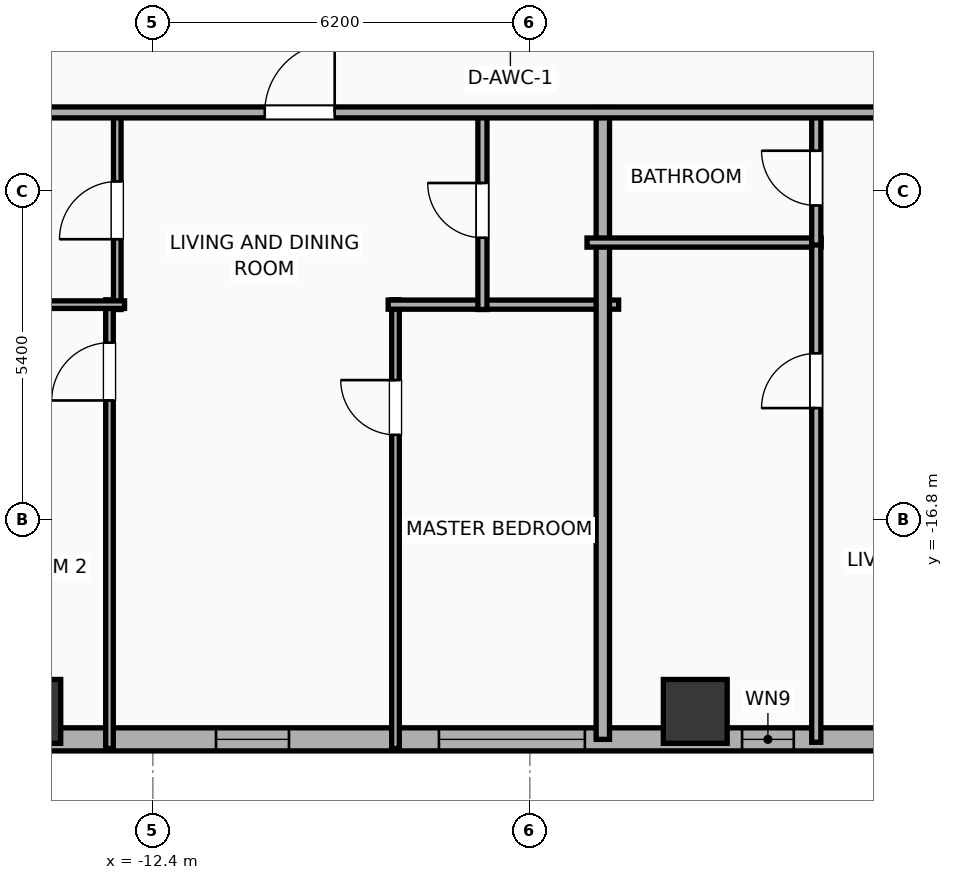
"""IFC4 building model, lengths in metres.
Left out: names, types, materials, properties, quantities, classifications, styles, units other than length and angle.
Written with IfcOpenShell. Run it as: python <this file> out.ifc"""

import sys

from ifc_helpers import new_model, si_unit, direction, frame, frame_2d, origin, origin_2d, place, context, subcontext, project, spatial, rectangle, hollow_rectangle, extrude, element, fill, save


model = new_model("IFC4")
c1 = context("Model", 3, precision=1e-05, world=origin(), true_north=direction((0.0, 1.0)))
c2 = subcontext(c1, "Body", "Model", "MODEL_VIEW")
j1 = project(units=[si_unit("LENGTHUNIT", "METRE"), si_unit("PLANEANGLEUNIT", "RADIAN")], contexts=[c1])
p1 = place(None, origin())
s1 = spatial("IfcSite", under=j1, at=p1, CompositionType="ELEMENT")
p2 = place(p1, origin())
s2 = spatial("IfcBuilding", under=s1, at=p2, CompositionType="ELEMENT")
p3 = place(p2, frame((0.0, 0.0, 101.4)))
s3 = spatial("IfcBuildingStorey", under=s2, at=p3, CompositionType="ELEMENT", Elevation=101.4)
for number, where, z_axis, x_axis in (
    (1, (-14.44, -19.95, 0.0), (0.0, 0.0, 1.0), (1.0, 0.0, 0.0)),
    (2, (-3.48, -19.95, 0.0), (0.0, 0.0, 1.0), (1.0, 0.0, 0.0)),
):
    element("IfcColumn", number, at=place(p3, frame(where, z_axis=z_axis, x_axis=x_axis)), inside=s3, PredefinedType="COLUMN", context=c2, shape_type="SweptSolid", body=[
        extrude(hollow_rectangle(XDim=1.05, YDim=1.05, WallThickness=0.036, at=origin_2d()), origin(), (0.0, 0.0, 1.0), 3.9),
    ])
p4 = place(p3, frame((29.381, -20.41, 0.0), z_axis=(0.0, 0.0, 1.0), x_axis=(-1.0, 0.0, 0.0)))
e3 = element("IfcWall", 3, at=p4, inside=s3, PredefinedType="ELEMENTEDWALL", context=c2, shape_type="SweptSolid", body=[
    extrude(rectangle(XDim=54.763, YDim=0.38, at=frame_2d((27.381, 0.0))), origin(), (0.0, 0.0, 1.0), 3.65),
])
p5 = place(p4, frame((6.495, 0.0, 0.75)))
e4 = element("IfcOpeningElement", 4, at=p5, cuts=e3, PredefinedType="OPENING", context=c2, shape_type="SweptSolid", body=[
    extrude(rectangle(XDim=2.4, YDim=2.1, at=frame_2d((1.2, 1.05))), frame((0.0, 0.2, 0.0), z_axis=(0.0, -1.0, 0.0), x_axis=(1.0, 0.0, 0.0)), (0.0, 0.0, 1.0), 0.4),
])
p6 = place(p4, frame((17.686, 0.0, 0.75)))
e5 = element("IfcOpeningElement", 5, at=p6, cuts=e3, PredefinedType="OPENING", context=c2, shape_type="SweptSolid", body=[
    extrude(rectangle(XDim=2.4, YDim=2.1, at=frame_2d((1.2, 1.05))), frame((0.0, 0.2, 0.0), z_axis=(0.0, -1.0, 0.0), x_axis=(1.0, 0.0, 0.0)), (0.0, 0.0, 1.0), 0.4),
])
p7 = place(p4, frame((34.677, 0.0, 0.75)))
e6 = element("IfcOpeningElement", 6, at=p7, cuts=e3, PredefinedType="OPENING", context=c2, shape_type="SweptSolid", body=[
    extrude(rectangle(XDim=2.4, YDim=2.1, at=frame_2d((1.2, 1.05))), frame((0.0, 0.2, 0.0), z_axis=(0.0, -1.0, 0.0), x_axis=(1.0, 0.0, 0.0)), (0.0, 0.0, 1.0), 0.4),
])
p8 = place(p4, frame((45.867, 0.0, 0.75)))
e7 = element("IfcOpeningElement", 7, at=p8, cuts=e3, PredefinedType="OPENING", context=c2, shape_type="SweptSolid", body=[
    extrude(rectangle(XDim=2.4, YDim=2.1, at=frame_2d((1.2, 1.05))), frame((0.0, 0.2, 0.0), z_axis=(0.0, -1.0, 0.0), x_axis=(1.0, 0.0, 0.0)), (0.0, 0.0, 1.0), 0.4),
])
p9 = place(p4, frame((52.281, 0.0, 0.75)))
e8 = element("IfcOpeningElement", 8, at=p9, cuts=e3, PredefinedType="OPENING", context=c2, shape_type="SweptSolid", body=[
    extrude(rectangle(XDim=1.2, YDim=2.05, at=frame_2d((0.6, 1.025))), frame((0.0, 0.2, 0.0), z_axis=(0.0, -1.0, 0.0), x_axis=(1.0, 0.0, 0.0)), (0.0, 0.0, 1.0), 0.4),
])
p10 = place(p4, frame((49.641, 0.0, 0.75)))
e9 = element("IfcOpeningElement", 9, at=p10, cuts=e3, PredefinedType="OPENING", context=c2, shape_type="SweptSolid", body=[
    extrude(rectangle(XDim=1.2, YDim=2.05, at=frame_2d((0.6, 1.025))), frame((0.0, 0.2, 0.0), z_axis=(0.0, -1.0, 0.0), x_axis=(1.0, 0.0, 0.0)), (0.0, 0.0, 1.0), 0.4),
])
p11 = place(p4, frame((39.543, 0.0, 0.75)))
e10 = element("IfcOpeningElement", 10, at=p11, cuts=e3, PredefinedType="OPENING", context=c2, shape_type="SweptSolid", body=[
    extrude(rectangle(XDim=1.2, YDim=2.05, at=frame_2d((0.6, 1.025))), frame((0.0, 0.2, 0.0), z_axis=(0.0, -1.0, 0.0), x_axis=(1.0, 0.0, 0.0)), (0.0, 0.0, 1.0), 0.4),
])
p12 = place(p4, frame((44.538, 0.0, 0.75)))
e11 = element("IfcOpeningElement", 11, at=p12, cuts=e3, PredefinedType="OPENING", context=c2, shape_type="SweptSolid", body=[
    extrude(rectangle(XDim=0.52, YDim=2.05, at=frame_2d((0.26, 1.025))), frame((0.0, 0.2, 0.0), z_axis=(0.0, -1.0, 0.0), x_axis=(1.0, 0.0, 0.0)), (0.0, 0.0, 1.0), 0.4),
])
p13 = place(p4, frame((28.206, 0.0, 0.75)))
e12 = element("IfcOpeningElement", 12, at=p13, cuts=e3, PredefinedType="OPENING", context=c2, shape_type="SweptSolid", body=[
    extrude(rectangle(XDim=1.2, YDim=2.05, at=frame_2d((0.6, 1.025))), frame((0.0, 0.2, 0.0), z_axis=(0.0, -1.0, 0.0), x_axis=(1.0, 0.0, 0.0)), (0.0, 0.0, 1.0), 0.4),
])
p14 = place(p4, frame((31.241, 0.0, 0.75)))
e13 = element("IfcOpeningElement", 13, at=p14, cuts=e3, PredefinedType="OPENING", context=c2, shape_type="SweptSolid", body=[
    extrude(rectangle(XDim=0.85, YDim=2.05, at=frame_2d((0.425, 1.025))), frame((0.0, 0.2, 0.0), z_axis=(0.0, -1.0, 0.0), x_axis=(1.0, 0.0, 0.0)), (0.0, 0.0, 1.0), 0.4),
])
p15 = place(p4, frame((24.561, 0.0, 0.75)))
e14 = element("IfcOpeningElement", 14, at=p15, cuts=e3, PredefinedType="OPENING", context=c2, shape_type="SweptSolid", body=[
    extrude(rectangle(XDim=1.2, YDim=2.05, at=frame_2d((0.6, 1.025))), frame((0.0, 0.2, 0.0), z_axis=(0.0, -1.0, 0.0), x_axis=(1.0, 0.0, 0.0)), (0.0, 0.0, 1.0), 0.4),
])
p16 = place(p4, frame((22.561, 0.0, 0.75)))
e15 = element("IfcOpeningElement", 15, at=p16, cuts=e3, PredefinedType="OPENING", context=c2, shape_type="SweptSolid", body=[
    extrude(rectangle(XDim=0.52, YDim=2.05, at=frame_2d((0.26, 1.025))), frame((0.0, 0.2, 0.0), z_axis=(0.0, -1.0, 0.0), x_axis=(1.0, 0.0, 0.0)), (0.0, 0.0, 1.0), 0.4),
])
p17 = place(p4, frame((13.886, 0.0, 0.75)))
e16 = element("IfcOpeningElement", 16, at=p17, cuts=e3, PredefinedType="OPENING", context=c2, shape_type="SweptSolid", body=[
    extrude(rectangle(XDim=1.2, YDim=2.05, at=frame_2d((0.6, 1.025))), frame((0.0, 0.2, 0.0), z_axis=(0.0, -1.0, 0.0), x_axis=(1.0, 0.0, 0.0)), (0.0, 0.0, 1.0), 0.4),
])
p18 = place(p4, frame((11.694, 0.0, 0.75)))
e17 = element("IfcOpeningElement", 17, at=p18, cuts=e3, PredefinedType="OPENING", context=c2, shape_type="SweptSolid", body=[
    extrude(rectangle(XDim=0.85, YDim=2.05, at=frame_2d((0.425, 1.025))), frame((0.0, 0.2, 0.0), z_axis=(0.0, -1.0, 0.0), x_axis=(1.0, 0.0, 0.0)), (0.0, 0.0, 1.0), 0.4),
])
p19 = place(p4, frame((3.286, 0.0, 0.75)))
e18 = element("IfcOpeningElement", 18, at=p19, cuts=e3, PredefinedType="OPENING", context=c2, shape_type="SweptSolid", body=[
    extrude(rectangle(XDim=1.2, YDim=2.05, at=frame_2d((0.6, 1.025))), frame((0.0, 0.2, 0.0), z_axis=(0.0, -1.0, 0.0), x_axis=(1.0, 0.0, 0.0)), (0.0, 0.0, 1.0), 0.4),
])
p20 = place(p4, frame((0.816, 0.0, 0.75)))
e19 = element("IfcOpeningElement", 19, at=p20, cuts=e3, PredefinedType="OPENING", context=c2, shape_type="SweptSolid", body=[
    extrude(rectangle(XDim=1.2, YDim=2.05, at=frame_2d((0.6, 1.025))), frame((0.0, 0.2, 0.0), z_axis=(0.0, -1.0, 0.0), x_axis=(1.0, 0.0, 0.0)), (0.0, 0.0, 1.0), 0.4),
])
p21 = place(p3, frame((-13.113, -20.56, 0.0), z_axis=(0.0, 0.0, 1.0), x_axis=(0.0, 1.0, 0.0)))
e20 = element("IfcWall", 20, at=p21, inside=s3, PredefinedType="PARTITIONING", context=c2, shape_type="SweptSolid", body=[
    extrude(rectangle(XDim=7.379, YDim=0.125, at=frame_2d((3.689, 0.0))), origin(), (0.0, 0.0, 1.0), 3.65),
])
p22 = place(p21, frame((5.723, 0.0, 0.0)))
e21 = element("IfcOpeningElement", 21, at=p22, cuts=e20, PredefinedType="OPENING", context=c2, shape_type="SweptSolid", body=[
    extrude(rectangle(XDim=0.95, YDim=2.05, at=frame_2d((0.475, 1.025))), frame((0.0, 0.073, 0.0), z_axis=(0.0, -1.0, 0.0), x_axis=(1.0, 0.0, 0.0)), (0.0, 0.0, 1.0), 0.145),
])
p23 = place(p3, frame((-8.41, -20.56, 0.0), z_axis=(0.0, 0.0, 1.0), x_axis=(0.0, 1.0, 0.0)))
e22 = element("IfcWall", 22, at=p23, inside=s3, PredefinedType="PARTITIONING", context=c2, shape_type="SweptSolid", body=[
    extrude(rectangle(XDim=7.379, YDim=0.125, at=frame_2d((3.689, 0.0))), origin(), (0.0, 0.0, 1.0), 3.65),
])
p24 = place(p23, frame((5.158, 0.0, 0.0)))
e23 = element("IfcOpeningElement", 23, at=p24, cuts=e22, PredefinedType="OPENING", context=c2, shape_type="SweptSolid", body=[
    extrude(rectangle(XDim=0.9, YDim=2.05, at=frame_2d((0.45, 1.025))), frame((0.0, 0.073, 0.0), z_axis=(0.0, -1.0, 0.0), x_axis=(1.0, 0.0, 0.0)), (0.0, 0.0, 1.0), 0.145),
])
p25 = place(p3, frame((-8.53, -13.261, 0.0), z_axis=(0.0, 0.0, 1.0), x_axis=(1.0, 0.0, 0.0)))
e24 = element("IfcWall", 24, at=p25, inside=s3, PredefinedType="PLUMBINGWALL", context=c2, shape_type="SweptSolid", body=[
    extrude(rectangle(XDim=3.79, YDim=0.15, at=frame_2d((1.895, 0.0))), origin(), (0.0, 0.0, 1.0), 3.65),
])
p26 = place(p3, frame((-12.985, -13.341, 0.0), z_axis=(0.0, 0.0, 1.0), x_axis=(0.0, 1.0, 0.0)))
e25 = element("IfcWall", 25, at=p26, inside=s3, PredefinedType="PARTITIONING", context=c2, shape_type="SweptSolid", body=[
    extrude(rectangle(XDim=3.261, YDim=0.125, at=frame_2d((1.63, 0.0))), origin(), (0.0, 0.0, 1.0), 3.65),
])
p27 = place(p26, frame((1.156, 0.0, 0.0)))
e26 = element("IfcOpeningElement", 26, at=p27, cuts=e25, PredefinedType="OPENING", context=c2, shape_type="SweptSolid", body=[
    extrude(rectangle(XDim=0.95, YDim=2.05, at=frame_2d((0.475, 1.025))), frame((0.0, 0.073, 0.0), z_axis=(0.0, -1.0, 0.0), x_axis=(1.0, 0.0, 0.0)), (0.0, 0.0, 1.0), 0.145),
])
p28 = place(p3, frame((-16.06, -13.261, 0.0), z_axis=(0.0, 0.0, 1.0), x_axis=(1.0, 0.0, 0.0)))
e27 = element("IfcWall", 27, at=p28, inside=s3, PredefinedType="PARTITIONING", context=c2, shape_type="SweptSolid", body=[
    extrude(rectangle(XDim=3.195, YDim=0.125, at=frame_2d((1.598, 0.0))), origin(), (0.0, 0.0, 1.0), 3.65),
])
p29 = place(p3, frame((-6.98, -13.341, 0.0), z_axis=(0.0, 0.0, 1.0), x_axis=(0.0, 1.0, 0.0)))
e28 = element("IfcWall", 28, at=p29, inside=s3, PredefinedType="PLUMBINGWALL", context=c2, shape_type="SweptSolid", body=[
    extrude(rectangle(XDim=3.261, YDim=0.15, at=frame_2d((1.63, 0.0))), origin(), (0.0, 0.0, 1.0), 3.65),
])
p30 = place(p29, frame((1.18, 0.0, 0.0)))
e29 = element("IfcOpeningElement", 29, at=p30, cuts=e28, PredefinedType="OPENING", context=c2, shape_type="SweptSolid", body=[
    extrude(rectangle(XDim=0.9, YDim=2.05, at=frame_2d((0.45, 1.025))), frame((0.0, 0.085, 0.0), z_axis=(0.0, -1.0, 0.0), x_axis=(1.0, 0.0, 0.0)), (0.0, 0.0, 1.0), 0.17),
])
p31 = place(p3, frame((-5.0, -20.41, 0.0), z_axis=(0.0, 0.0, 1.0), x_axis=(0.0, 1.0, 0.0)))
e30 = element("IfcWall", 30, at=p31, inside=s3, PredefinedType="PARTITIONING", context=c2, shape_type="SweptSolid", body=[
    extrude(rectangle(XDim=10.39, YDim=0.22, at=frame_2d((5.195, 0.0))), origin(), (0.0, 0.0, 1.0), 3.65),
])
p32 = place(p3, frame((-5.26, -12.24, 0.0), z_axis=(0.0, 0.0, 1.0), x_axis=(1.0, 0.0, 0.0)))
e31 = element("IfcWall", 31, at=p32, inside=s3, PredefinedType="PLUMBINGWALL", context=c2, shape_type="SweptSolid", body=[
    extrude(rectangle(XDim=3.85, YDim=0.15, at=frame_2d((1.925, 0.0))), origin(), (0.0, 0.0, 1.0), 3.65),
])
p33 = place(p3, frame((-1.49, -20.458, 0.0), z_axis=(0.0, 0.0, 1.0), x_axis=(0.0, 1.0, 0.0)))
e32 = element("IfcWall", 32, at=p33, inside=s3, PredefinedType="PLUMBINGWALL", context=c2, shape_type="SweptSolid", body=[
    extrude(rectangle(XDim=8.258, YDim=0.15, at=frame_2d((4.129, 0.0))), origin(), (0.0, 0.0, 1.0), 3.65),
])
p34 = place(p33, frame((5.496, 0.0, 0.0)))
e33 = element("IfcOpeningElement", 33, at=p34, cuts=e32, PredefinedType="OPENING", context=c2, shape_type="SweptSolid", body=[
    extrude(rectangle(XDim=0.9, YDim=2.05, at=frame_2d((0.45, 1.025))), frame((0.0, 0.085, 0.0), z_axis=(0.0, -1.0, 0.0), x_axis=(1.0, 0.0, 0.0)), (0.0, 0.0, 1.0), 0.17),
])
p35 = place(p3, frame((-1.49, -12.28, 0.0), z_axis=(0.0, 0.0, 1.0), x_axis=(0.0, 1.0, 0.0)))
e34 = element("IfcWall", 34, at=p35, inside=s3, PredefinedType="PLUMBINGWALL", context=c2, shape_type="SweptSolid", body=[
    extrude(rectangle(XDim=2.2, YDim=0.15, at=frame_2d((1.1, 0.0))), origin(), (0.0, 0.0, 1.0), 3.65),
])
p36 = place(p35, frame((0.65, 0.0, 0.0)))
e35 = element("IfcOpeningElement", 35, at=p36, cuts=e34, PredefinedType="OPENING", context=c2, shape_type="SweptSolid", body=[
    extrude(rectangle(XDim=0.9, YDim=2.05, at=frame_2d((0.45, 1.025))), frame((0.0, 0.085, 0.0), z_axis=(0.0, -1.0, 0.0), x_axis=(1.0, 0.0, 0.0)), (0.0, 0.0, 1.0), 0.17),
])
p37 = place(p3, frame((-29.21, -10.1, 0.0), z_axis=(0.0, 0.0, 1.0), x_axis=(1.0, 0.0, 0.0)))
e36 = element("IfcWall", 36, at=p37, inside=s3, PredefinedType="PARTITIONING", context=c2, shape_type="SweptSolid", body=[
    extrude(rectangle(XDim=62.42, YDim=0.18, at=frame_2d((31.21, 0.0))), origin(), (0.0, 0.0, 1.0), 3.65),
])
p38 = place(p37, frame((3.033, 0.0, 0.0)))
e37 = element("IfcOpeningElement", 37, at=p38, cuts=e36, PredefinedType="OPENING", context=c2, shape_type="SweptSolid", body=[
    extrude(rectangle(XDim=0.9, YDim=2.05, at=frame_2d((0.45, 1.025))), frame((0.0, 0.1, 0.0), z_axis=(0.0, -1.0, 0.0), x_axis=(1.0, 0.0, 0.0)), (0.0, 0.0, 1.0), 0.2),
])
p39 = place(p37, frame((9.768, 0.0, 0.0)))
e38 = element("IfcOpeningElement", 38, at=p39, cuts=e36, PredefinedType="OPENING", context=c2, shape_type="SweptSolid", body=[
    extrude(rectangle(XDim=0.9, YDim=2.05, at=frame_2d((0.45, 1.025))), frame((0.0, 0.1, 0.0), z_axis=(0.0, -1.0, 0.0), x_axis=(1.0, 0.0, 0.0)), (0.0, 0.0, 1.0), 0.2),
])
p40 = place(p37, frame((18.65, 0.0, 0.0)))
e39 = element("IfcOpeningElement", 39, at=p40, cuts=e36, PredefinedType="OPENING", context=c2, shape_type="SweptSolid", body=[
    extrude(rectangle(XDim=1.15, YDim=2.05, at=frame_2d((0.575, 1.025))), frame((0.0, 0.1, 0.0), z_axis=(0.0, -1.0, 0.0), x_axis=(1.0, 0.0, 0.0)), (0.0, 0.0, 1.0), 0.2),
])
p41 = place(p37, frame((29.212, 0.0, 0.0)))
e40 = element("IfcOpeningElement", 40, at=p41, cuts=e36, PredefinedType="OPENING", context=c2, shape_type="SweptSolid", body=[
    extrude(rectangle(XDim=1.15, YDim=2.05, at=frame_2d((0.575, 1.025))), frame((0.0, 0.1, 0.0), z_axis=(0.0, -1.0, 0.0), x_axis=(1.0, 0.0, 0.0)), (0.0, 0.0, 1.0), 0.2),
])
p42 = place(p37, frame((40.379, 0.0, 0.0)))
e41 = element("IfcOpeningElement", 41, at=p42, cuts=e36, PredefinedType="OPENING", context=c2, shape_type="SweptSolid", body=[
    extrude(rectangle(XDim=1.15, YDim=2.05, at=frame_2d((0.575, 1.025))), frame((0.0, 0.1, 0.0), z_axis=(0.0, -1.0, 0.0), x_axis=(1.0, 0.0, 0.0)), (0.0, 0.0, 1.0), 0.2),
])
p43 = place(p37, frame((50.959, 0.0, 0.0)))
e42 = element("IfcOpeningElement", 42, at=p43, cuts=e36, PredefinedType="OPENING", context=c2, shape_type="SweptSolid", body=[
    extrude(rectangle(XDim=1.15, YDim=2.05, at=frame_2d((0.575, 1.025))), frame((0.0, 0.1, 0.0), z_axis=(0.0, -1.0, 0.0), x_axis=(1.0, 0.0, 0.0)), (0.0, 0.0, 1.0), 0.2),
])
p44 = place(p37, frame((59.117, 0.0, 0.0)))
e43 = element("IfcOpeningElement", 43, at=p44, cuts=e36, PredefinedType="OPENING", context=c2, shape_type="SweptSolid", body=[
    extrude(rectangle(XDim=0.9, YDim=2.05, at=frame_2d((0.45, 1.025))), frame((0.0, 0.1, 0.0), z_axis=(0.0, -1.0, 0.0), x_axis=(1.0, 0.0, 0.0)), (0.0, 0.0, 1.0), 0.2),
])
p45 = place(p7, origin())
e44 = element("IfcWindow", 44, at=p45, inside=s3, PartitioningType="SINGLE_PANEL", PredefinedType="WINDOW", context=c2, shape_type="SweptSolid", body=[
    extrude(rectangle(XDim=2.4, YDim=2.1, at=frame_2d((1.2, 1.05))), frame((0.0, 0.03, 0.0), z_axis=(0.0, -1.0, 0.0), x_axis=(1.0, 0.0, 0.0)), (0.0, 0.0, 1.0), 0.06),
])
fill(e6, e44)
p46 = place(p11, origin())
e45 = element("IfcWindow", 45, at=p46, inside=s3, PartitioningType="SINGLE_PANEL", PredefinedType="WINDOW", context=c2, shape_type="SweptSolid", body=[
    extrude(rectangle(XDim=1.2, YDim=2.05, at=frame_2d((0.6, 1.025))), frame((0.0, 0.03, 0.0), z_axis=(0.0, -1.0, 0.0), x_axis=(1.0, 0.0, 0.0)), (0.0, 0.0, 1.0), 0.06),
])
fill(e10, e45)
p47 = place(p14, origin())
e46 = element("IfcWindow", 46, at=p47, inside=s3, PartitioningType="SINGLE_PANEL", PredefinedType="WINDOW", context=c2, shape_type="SweptSolid", body=[
    extrude(rectangle(XDim=0.85, YDim=2.05, at=frame_2d((0.425, 1.025))), frame((0.0, 0.03, 0.0), z_axis=(0.0, -1.0, 0.0), x_axis=(1.0, 0.0, 0.0)), (0.0, 0.0, 1.0), 0.06),
])
fill(e13, e46)
p48 = place(p22, origin())
e47 = element("IfcDoor", 47, at=p48, inside=s3, OperationType="SINGLE_SWING_LEFT", PredefinedType="DOOR", context=c2, shape_type="SweptSolid", body=[
    extrude(rectangle(XDim=0.95, YDim=2.05, at=frame_2d((0.475, 1.025))), frame((0.0, 0.025, 0.0), z_axis=(0.0, -1.0, 0.0), x_axis=(1.0, 0.0, 0.0)), (0.0, 0.0, 1.0), 0.05),
])
fill(e21, e47)
p49 = place(p24, origin())
e48 = element("IfcDoor", 48, at=p49, inside=s3, OperationType="SINGLE_SWING_RIGHT", PredefinedType="DOOR", context=c2, shape_type="SweptSolid", body=[
    extrude(rectangle(XDim=0.9, YDim=2.05, at=frame_2d((0.45, 1.025))), frame((0.0, 0.025, 0.0), z_axis=(0.0, -1.0, 0.0), x_axis=(1.0, 0.0, 0.0)), (0.0, 0.0, 1.0), 0.05),
])
fill(e23, e48)
p50 = place(p27, origin())
e49 = element("IfcDoor", 49, at=p50, inside=s3, OperationType="SINGLE_SWING_LEFT", PredefinedType="DOOR", context=c2, shape_type="SweptSolid", body=[
    extrude(rectangle(XDim=0.95, YDim=2.05, at=frame_2d((0.475, 1.025))), frame((0.0, 0.025, 0.0), z_axis=(0.0, -1.0, 0.0), x_axis=(1.0, 0.0, 0.0)), (0.0, 0.0, 1.0), 0.05),
])
fill(e26, e49)
p51 = place(p30, origin())
e50 = element("IfcDoor", 50, at=p51, inside=s3, OperationType="SINGLE_SWING_RIGHT", PredefinedType="DOOR", context=c2, shape_type="SweptSolid", body=[
    extrude(rectangle(XDim=0.9, YDim=2.05, at=frame_2d((0.45, 1.025))), frame((0.0, 0.025, 0.0), z_axis=(0.0, -1.0, 0.0), x_axis=(1.0, 0.0, 0.0)), (0.0, 0.0, 1.0), 0.05),
])
fill(e29, e50)
p52 = place(p34, origin())
e51 = element("IfcDoor", 51, at=p52, inside=s3, OperationType="SINGLE_SWING_LEFT", PredefinedType="DOOR", context=c2, shape_type="SweptSolid", body=[
    extrude(rectangle(XDim=0.9, YDim=2.05, at=frame_2d((0.45, 1.025))), frame((0.0, 0.025, 0.0), z_axis=(0.0, -1.0, 0.0), x_axis=(1.0, 0.0, 0.0)), (0.0, 0.0, 1.0), 0.05),
])
fill(e33, e51)
p53 = place(p36, origin())
e52 = element("IfcDoor", 52, at=p53, inside=s3, OperationType="SINGLE_SWING_RIGHT", PredefinedType="DOOR", context=c2, shape_type="SweptSolid", body=[
    extrude(rectangle(XDim=0.9, YDim=2.05, at=frame_2d((0.45, 1.025))), frame((0.0, 0.025, 0.0), z_axis=(0.0, -1.0, 0.0), x_axis=(1.0, 0.0, 0.0)), (0.0, 0.0, 1.0), 0.05),
])
fill(e35, e52)
p54 = place(p40, origin())
e53 = element("IfcDoor", 53, at=p54, inside=s3, OperationType="SINGLE_SWING_RIGHT", PredefinedType="DOOR", context=c2, shape_type="SweptSolid", body=[
    extrude(rectangle(XDim=1.15, YDim=2.05, at=frame_2d((0.575, 1.025))), frame((0.0, 0.025, 0.0), z_axis=(0.0, -1.0, 0.0), x_axis=(1.0, 0.0, 0.0)), (0.0, 0.0, 1.0), 0.05),
])
fill(e39, e53)
save(model, sys.argv[1])
